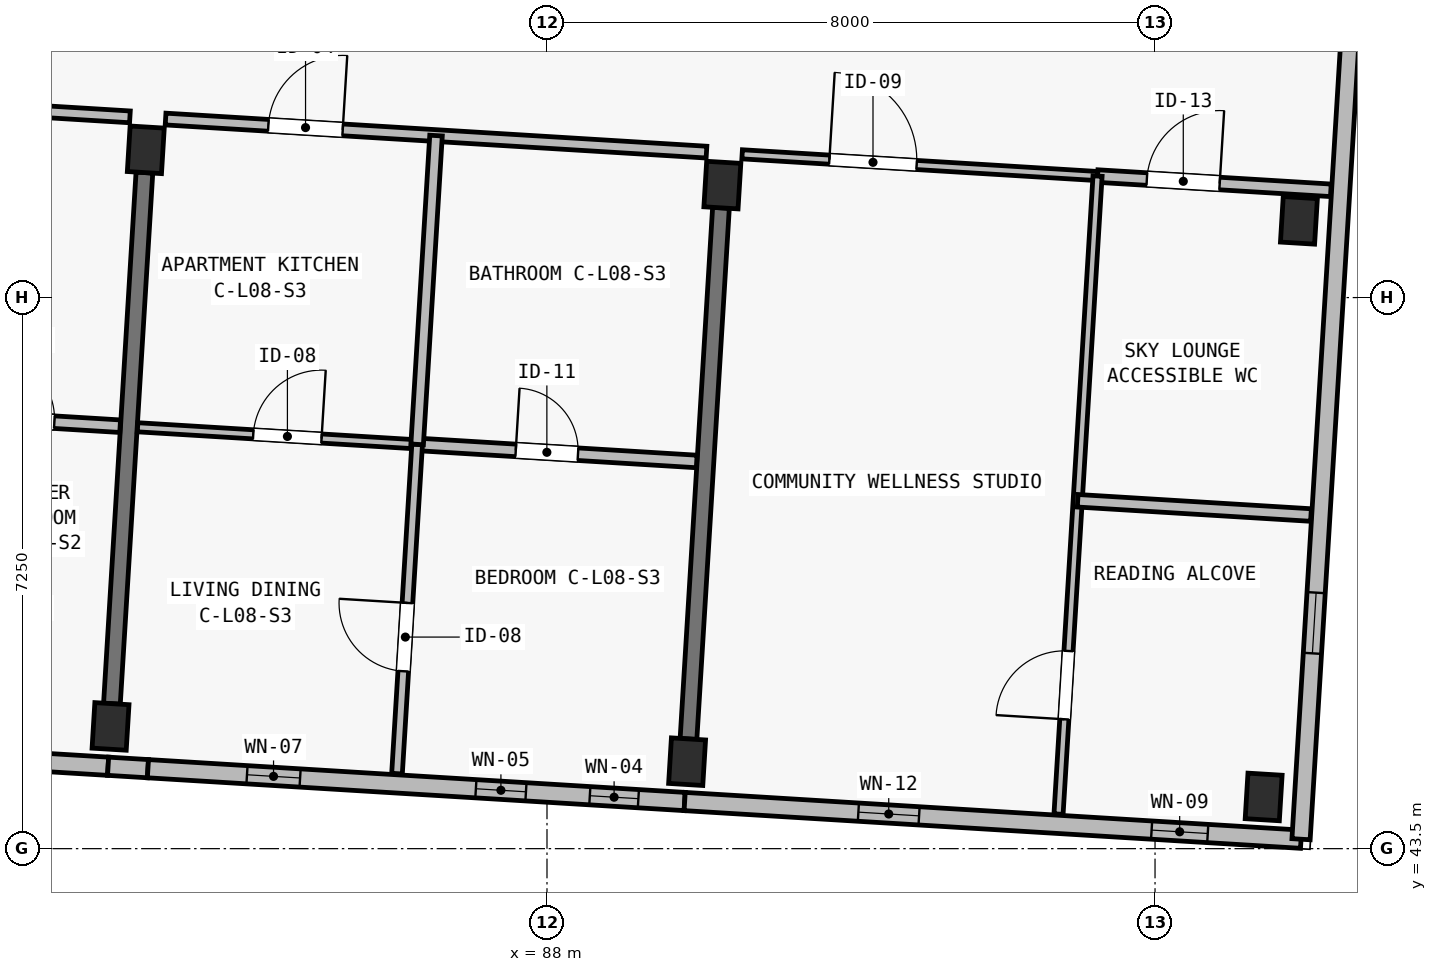
"""IFC4 building model, lengths in metres.
Left out: names, types, materials, properties, quantities, classifications, styles, units other than length and angle.
Written with IfcOpenShell. Run it as: python <this file> out.ifc"""

import sys

from ifc_helpers import new_model, si_unit, direction, frame, frame_2d, origin, origin_2d, place, context, subcontext, project, spatial, polyline, rectangle, outline, extrude, element, fill, save


model = new_model("IFC4")
c1 = context("Model", 3, precision=1e-05, world=origin(), true_north=direction((0.0, 1.0)))
c2 = subcontext(c1, "Body", "Model", "MODEL_VIEW")
j1 = project(units=[si_unit("LENGTHUNIT", "METRE"), si_unit("PLANEANGLEUNIT", "RADIAN")], contexts=[c1])
p1 = place(None, origin())
s1 = spatial("IfcSite", under=j1, at=p1, CompositionType="ELEMENT")
p2 = place(p1, origin())
s2 = spatial("IfcBuilding", under=s1, at=p2, CompositionType="ELEMENT")
p3 = place(p2, frame((0.0, 0.0, 27.9)))
s3 = spatial("IfcBuildingStorey", under=s2, at=p3, CompositionType="ELEMENT", Elevation=27.9)
for number, where, z_axis, x_axis in (
    (1, (82.258, 45.108, 0.0), (0.0, 0.0, 1.0), (0.998, -0.061, 0.0)),
    (2, (82.721, 52.694, 0.0), (0.0, 0.0, 1.0), (0.998, -0.061, 0.0)),
    (3, (89.843, 44.644, 0.0), (0.0, 0.0, 1.0), (0.998, -0.061, 0.0)),
    (4, (90.307, 52.23, 0.0), (0.0, 0.0, 1.0), (0.998, -0.061, 0.0)),
    (5, (97.429, 44.18, 0.0), (0.0, 0.0, 1.0), (0.998, -0.061, 0.0)),
    (6, (97.893, 51.766, 0.0), (0.0, 0.0, 1.0), (0.998, -0.061, 0.0)),
):
    element("IfcColumn", number, at=place(p3, frame(where, z_axis=z_axis, x_axis=x_axis)), inside=s3, PredefinedType="COLUMN", context=c2, shape_type="SweptSolid", body=[
        extrude(rectangle(XDim=0.45, YDim=0.6, at=origin_2d()), origin(), (0.0, 0.0, 1.0), 3.25),
    ])
for number, where, z_axis, x_axis in (
    (7, (82.276, 45.407, 0.0), (0.0, 0.0, 1.0), (0.061, 0.998, 0.0)),
    (8, (89.862, 44.944, 0.0), (0.0, 0.0, 1.0), (0.061, 0.998, 0.0)),
):
    element("IfcWall", number, at=place(p3, frame(where, z_axis=z_axis, x_axis=x_axis)), inside=s3, PredefinedType="SHEAR", context=c2, shape_type="SweptSolid", body=[
        extrude(rectangle(XDim=7.0, YDim=0.22, at=frame_2d((3.5, 0.0))), origin(), (0.0, 0.0, 1.0), 2.5),
    ])
p4 = place(p3, frame((82.225, 44.584, 0.0), z_axis=(0.0, 0.0, 1.0), x_axis=(-0.998133591969, 0.061068261669, 0.0)))
e9 = element("IfcWall", 9, at=p4, inside=s3, PredefinedType="SOLIDWALL", context=c2, shape_type="SweptSolid", body=[
    extrude(rectangle(XDim=7.6, YDim=0.24, at=frame_2d((3.8, 0.0))), origin(), (0.0, 0.0, 1.0), 3.0),
])
p5 = place(p4, frame((5.019, 0.0, 0.0)))
e10 = element("IfcOpeningElement", 10, at=p5, cuts=e9, PredefinedType="OPENING", context=c2, shape_type="SweptSolid", body=[
    extrude(rectangle(XDim=1.8, YDim=2.12, at=frame_2d((0.9, 1.06))), frame((0.0, 0.135, 0.0), z_axis=(0.0, -1.0, 0.0), x_axis=(1.0, 0.0, 0.0)), (0.0, 0.0, 1.0), 0.27),
])
p6 = place(p4, frame((0.93, 0.0, 0.46)))
e11 = element("IfcOpeningElement", 11, at=p6, cuts=e9, PredefinedType="OPENING", context=c2, shape_type="SweptSolid", body=[
    extrude(rectangle(XDim=0.74, YDim=2.26, at=frame_2d((0.37, 1.13))), frame((0.0, 0.135, 0.0), z_axis=(0.0, -1.0, 0.0), x_axis=(1.0, 0.0, 0.0)), (0.0, 0.0, 1.0), 0.27),
])
p7 = place(p3, frame((82.75, 44.552, 0.0), z_axis=(0.0, 0.0, 1.0), x_axis=(-0.998143743648, 0.060902110115, 0.0)))
e12 = element("IfcWall", 12, at=p7, inside=s3, PredefinedType="SOLIDWALL", context=c2, shape_type="SweptSolid", body=[
    extrude(rectangle(XDim=0.525, YDim=0.24, at=frame_2d((0.263, 0.0))), origin(), (0.0, 0.0, 1.0), 3.0),
])
p8 = place(p3, frame((89.811, 44.12, 0.0), z_axis=(0.0, 0.0, 1.0), x_axis=(-0.998135069216, 0.061044111925, 0.0)))
e13 = element("IfcWall", 13, at=p8, inside=s3, PredefinedType="SOLIDWALL", context=c2, shape_type="SweptSolid", body=[
    extrude(outline(polyline([(0.0, 0.0), (7.075, 0.0), (7.075, 6.222), (0.0, 4.861), (0.0, 0.0)])), frame((0.0, 0.12, 0.0), z_axis=(0.0, -1.0, 0.0), x_axis=(1.0, 0.0, 0.0)), (0.0, 0.0, 1.0), 0.24),
])
p9 = place(p8, frame((0.61, 0.0, 0.52)))
e14 = element("IfcOpeningElement", 14, at=p9, cuts=e13, PredefinedType="OPENING", context=c2, shape_type="SweptSolid", body=[
    extrude(rectangle(XDim=0.64, YDim=2.18, at=frame_2d((0.32, 1.09))), frame((0.0, 0.135, 0.0), z_axis=(0.0, -1.0, 0.0), x_axis=(1.0, 0.0, 0.0)), (0.0, 0.0, 1.0), 0.27),
])
p10 = place(p8, frame((2.092, 0.0, 0.42)))
e15 = element("IfcOpeningElement", 15, at=p10, cuts=e13, PredefinedType="OPENING", context=c2, shape_type="SweptSolid", body=[
    extrude(rectangle(XDim=0.66, YDim=2.32, at=frame_2d((0.33, 1.16))), frame((0.0, 0.135, 0.0), z_axis=(0.0, -1.0, 0.0), x_axis=(1.0, 0.0, 0.0)), (0.0, 0.0, 1.0), 0.27),
])
p11 = place(p8, frame((5.069, 0.0, 0.52)))
e16 = element("IfcOpeningElement", 16, at=p11, cuts=e13, PredefinedType="OPENING", context=c2, shape_type="SweptSolid", body=[
    extrude(rectangle(XDim=0.7, YDim=2.36, at=frame_2d((0.35, 1.18))), frame((0.0, 0.135, 0.0), z_axis=(0.0, -1.0, 0.0), x_axis=(1.0, 0.0, 0.0)), (0.0, 0.0, 1.0), 0.27),
])
p12 = place(p3, frame((97.921, 43.624, 0.0), z_axis=(0.0, 0.0, 1.0), x_axis=(-0.998134248939, 0.061057522844, 0.0)))
e17 = element("IfcWall", 17, at=p12, inside=s3, PredefinedType="SOLIDWALL", context=c2, shape_type="SweptSolid", body=[
    extrude(outline(polyline([(0.0, 0.0), (8.125, 0.0), (8.125, 4.861), (0.0, 3.298), (0.0, 0.0)])), frame((0.0, 0.12, 0.0), z_axis=(0.0, -1.0, 0.0), x_axis=(1.0, 0.0, 0.0)), (0.0, 0.0, 1.0), 0.24),
])
p13 = place(p12, frame((1.23, 0.0, 0.42)))
e18 = element("IfcOpeningElement", 18, at=p13, cuts=e17, PredefinedType="OPENING", context=c2, shape_type="SweptSolid", body=[
    extrude(rectangle(XDim=0.74, YDim=2.26, at=frame_2d((0.37, 1.13))), frame((0.0, 0.135, 0.0), z_axis=(0.0, -1.0, 0.0), x_axis=(1.0, 0.0, 0.0)), (0.0, 0.0, 1.0), 0.27),
])
p14 = place(p12, frame((5.035, 0.0, 0.42)))
e19 = element("IfcOpeningElement", 19, at=p14, cuts=e17, PredefinedType="OPENING", context=c2, shape_type="SweptSolid", body=[
    extrude(rectangle(XDim=0.8, YDim=2.3, at=frame_2d((0.4, 1.15))), frame((0.0, 0.135, 0.0), z_axis=(0.0, -1.0, 0.0), x_axis=(1.0, 0.0, 0.0)), (0.0, 0.0, 1.0), 0.27),
])
p15 = place(p3, frame((99.182, 64.236, 0.0), z_axis=(0.0, 0.0, 1.0), x_axis=(-0.061040833846, -0.998135269692, 0.0)))
e20 = element("IfcWall", 20, at=p15, inside=s3, PredefinedType="SOLIDWALL", context=c2, shape_type="SweptSolid", body=[
    extrude(rectangle(XDim=20.65, YDim=0.24, at=frame_2d((10.325, 0.0))), origin(), (0.0, 0.0, 1.0), 3.298),
])
p16 = place(p15, frame((2.45, 0.0, 0.45)))
e21 = element("IfcOpeningElement", 21, at=p16, cuts=e20, PredefinedType="OPENING", context=c2, shape_type="SweptSolid", body=[
    extrude(rectangle(XDim=0.66, YDim=2.32, at=frame_2d((0.33, 1.16))), frame((0.0, 0.135, 0.0), z_axis=(0.0, -1.0, 0.0), x_axis=(1.0, 0.0, 0.0)), (0.0, 0.0, 1.0), 0.27),
])
p17 = place(p15, frame((17.4, 0.0, 0.52)))
e22 = element("IfcOpeningElement", 22, at=p17, cuts=e20, PredefinedType="OPENING", context=c2, shape_type="SweptSolid", body=[
    extrude(rectangle(XDim=0.8, YDim=2.3, at=frame_2d((0.4, 1.15))), frame((0.0, 0.135, 0.0), z_axis=(0.0, -1.0, 0.0), x_axis=(1.0, 0.0, 0.0)), (0.0, 0.0, 1.0), 0.27),
])
p18 = place(p3, frame((78.415, 53.378, 0.0), z_axis=(0.0, 0.0, 1.0), x_axis=(0.998132736029, -0.061082250024, 0.0)))
e23 = element("IfcWall", 23, at=p18, inside=s3, PredefinedType="PARTITIONING", context=c2, shape_type="SweptSolid", body=[
    extrude(rectangle(XDim=4.105, YDim=0.155, at=frame_2d((2.052, 0.0))), origin(), (0.0, 0.0, 1.0), 2.97),
])
p19 = place(p18, frame((0.457, 0.0, 0.0)))
e24 = element("IfcOpeningElement", 24, at=p19, cuts=e23, PredefinedType="OPENING", context=c2, shape_type="SweptSolid", body=[
    extrude(rectangle(XDim=1.02, YDim=2.2, at=frame_2d((0.51, 1.1))), frame((0.0, 0.093, 0.0), z_axis=(0.0, -1.0, 0.0), x_axis=(1.0, 0.0, 0.0)), (0.0, 0.0, 1.0), 0.185),
])
p20 = place(p3, frame((80.098, 49.198, 0.0), z_axis=(0.0, 0.0, 1.0), x_axis=(0.998138723231, -0.060984335579, 0.0)))
e25 = element("IfcWall", 25, at=p20, inside=s3, PredefinedType="PLUMBINGWALL", context=c2, shape_type="SweptSolid", body=[
    extrude(rectangle(XDim=2.29, YDim=0.165, at=frame_2d((1.145, 0.0))), origin(), (0.0, 0.0, 1.0), 2.97),
])
p21 = place(p20, frame((0.603, 0.0, 0.0)))
e26 = element("IfcOpeningElement", 26, at=p21, cuts=e25, PredefinedType="OPENING", context=c2, shape_type="SweptSolid", body=[
    extrude(rectangle(XDim=0.82, YDim=2.08, at=frame_2d((0.41, 1.04))), frame((0.0, 0.097, 0.0), z_axis=(0.0, -1.0, 0.0), x_axis=(1.0, 0.0, 0.0)), (0.0, 0.0, 1.0), 0.195),
])
p22 = place(p3, frame((82.982, 53.099, 0.0), z_axis=(0.0, 0.0, 1.0), x_axis=(0.998134569689, -0.061052279168, 0.0)))
e27 = element("IfcWall", 27, at=p22, inside=s3, PredefinedType="PARTITIONING", context=c2, shape_type="SweptSolid", body=[
    extrude(rectangle(XDim=7.13, YDim=0.155, at=frame_2d((3.565, 0.0))), origin(), (0.0, 0.0, 1.0), 2.97),
])
p23 = place(p22, frame((1.355, 0.0, 0.0)))
e28 = element("IfcOpeningElement", 28, at=p23, cuts=e27, PredefinedType="OPENING", context=c2, shape_type="SweptSolid", body=[
    extrude(rectangle(XDim=0.98, YDim=2.15, at=frame_2d((0.49, 1.075))), frame((0.0, 0.093, 0.0), z_axis=(0.0, -1.0, 0.0), x_axis=(1.0, 0.0, 0.0)), (0.0, 0.0, 1.0), 0.185),
])
p24 = place(p3, frame((82.613, 49.044, 0.0), z_axis=(0.0, 0.0, 1.0), x_axis=(0.998136719672, -0.061017119263, 0.0)))
e29 = element("IfcWall", 29, at=p24, inside=s3, PredefinedType="PARTITIONING", context=c2, shape_type="SweptSolid", body=[
    extrude(rectangle(XDim=3.685, YDim=0.12, at=frame_2d((1.843, 0.0))), origin(), (0.0, 0.0, 1.0), 2.97),
])
p25 = place(p24, frame((1.525, 0.0, 0.0)))
e30 = element("IfcOpeningElement", 30, at=p25, cuts=e29, PredefinedType="OPENING", context=c2, shape_type="SweptSolid", body=[
    extrude(rectangle(XDim=0.9, YDim=2.1, at=frame_2d((0.45, 1.05))), frame((0.0, 0.075, 0.0), z_axis=(0.0, -1.0, 0.0), x_axis=(1.0, 0.0, 0.0)), (0.0, 0.0, 1.0), 0.15),
])
p26 = place(p3, frame((86.292, 48.819, 0.0), z_axis=(0.0, 0.0, 1.0), x_axis=(0.998132682596, -0.061083123148, 0.0)))
e31 = element("IfcWall", 31, at=p26, inside=s3, PredefinedType="PLUMBINGWALL", context=c2, shape_type="SweptSolid", body=[
    extrude(rectangle(XDim=3.685, YDim=0.165, at=frame_2d((1.843, 0.0))), origin(), (0.0, 0.0, 1.0), 2.97),
])
p27 = place(p26, frame((1.3, 0.0, 0.0)))
e32 = element("IfcOpeningElement", 32, at=p27, cuts=e31, PredefinedType="OPENING", context=c2, shape_type="SweptSolid", body=[
    extrude(rectangle(XDim=0.82, YDim=2.08, at=frame_2d((0.41, 1.04))), frame((0.0, 0.097, 0.0), z_axis=(0.0, -1.0, 0.0), x_axis=(1.0, 0.0, 0.0)), (0.0, 0.0, 1.0), 0.195),
])
p28 = place(p3, frame((86.027, 44.487, 0.0), z_axis=(0.0, 0.0, 1.0), x_axis=(0.06103343432, 0.998135722182, 0.0)))
e33 = element("IfcWall", 33, at=p28, inside=s3, PredefinedType="PARTITIONING", context=c2, shape_type="SweptSolid", body=[
    extrude(rectangle(XDim=4.34, YDim=0.14, at=frame_2d((2.17, 0.0))), origin(), (0.0, 0.0, 1.0), 2.97),
])
p29 = place(p28, frame((1.35, 0.0, 0.0)))
e34 = element("IfcOpeningElement", 34, at=p29, cuts=e33, PredefinedType="OPENING", context=c2, shape_type="SweptSolid", body=[
    extrude(rectangle(XDim=0.9, YDim=2.1, at=frame_2d((0.45, 1.05))), frame((0.0, 0.085, 0.0), z_axis=(0.0, -1.0, 0.0), x_axis=(1.0, 0.0, 0.0)), (0.0, 0.0, 1.0), 0.17),
])
p30 = place(p3, frame((86.292, 48.819, 0.0), z_axis=(0.0, 0.0, 1.0), x_axis=(0.061067374954, 0.99813364622, 0.0)))
e35 = element("IfcWall", 35, at=p30, inside=s3, PredefinedType="PLUMBINGWALL", context=c2, shape_type="SweptSolid", body=[
    extrude(rectangle(XDim=4.07, YDim=0.165, at=frame_2d((2.035, 0.0))), origin(), (0.0, 0.0, 1.0), 2.97),
])
p31 = place(p3, frame((90.567, 52.635, 0.0), z_axis=(0.0, 0.0, 1.0), x_axis=(0.998136413786, -0.061022122823, 0.0)))
e36 = element("IfcWall", 36, at=p31, inside=s3, PredefinedType="PARTITIONING", context=c2, shape_type="SweptSolid", body=[
    extrude(rectangle(XDim=4.685, YDim=0.12, at=frame_2d((2.343, 0.0))), origin(), (0.0, 0.0, 1.0), 3.15),
])
p32 = place(p31, frame((1.15, 0.0, 0.0)))
e37 = element("IfcOpeningElement", 37, at=p32, cuts=e36, PredefinedType="OPENING", context=c2, shape_type="SweptSolid", body=[
    extrude(rectangle(XDim=1.15, YDim=2.15, at=frame_2d((0.575, 1.075))), frame((0.0, 0.075, 0.0), z_axis=(0.0, -1.0, 0.0), x_axis=(1.0, 0.0, 0.0)), (0.0, 0.0, 1.0), 0.15),
])
p33 = place(p3, frame((95.244, 52.349, 0.0), z_axis=(0.0, 0.0, 1.0), x_axis=(0.998134491017, -0.061053565351, 0.0)))
e38 = element("IfcWall", 38, at=p33, inside=s3, PredefinedType="PLUMBINGWALL", context=c2, shape_type="SweptSolid", body=[
    extrude(rectangle(XDim=3.075, YDim=0.165, at=frame_2d((1.538, 0.0))), origin(), (0.0, 0.0, 1.0), 3.15),
])
p34 = place(p33, frame((0.65, 0.0, 0.0)))
e39 = element("IfcOpeningElement", 39, at=p34, cuts=e38, PredefinedType="OPENING", context=c2, shape_type="SweptSolid", body=[
    extrude(rectangle(XDim=0.96, YDim=2.12, at=frame_2d((0.48, 1.06))), frame((0.0, 0.097, 0.0), z_axis=(0.0, -1.0, 0.0), x_axis=(1.0, 0.0, 0.0)), (0.0, 0.0, 1.0), 0.195),
])
p35 = place(p3, frame((94.73, 43.955, 0.0), z_axis=(0.0, 0.0, 1.0), x_axis=(0.061049859271, 0.998134717702, 0.0)))
e40 = element("IfcWall", 40, at=p35, inside=s3, PredefinedType="PARTITIONING", context=c2, shape_type="SweptSolid", body=[
    extrude(rectangle(XDim=8.41, YDim=0.12, at=frame_2d((4.205, 0.0))), origin(), (0.0, 0.0, 1.0), 3.15),
])
p36 = place(p35, frame((1.25, 0.0, 0.0)))
e41 = element("IfcOpeningElement", 41, at=p36, cuts=e40, PredefinedType="OPENING", context=c2, shape_type="SweptSolid", body=[
    extrude(rectangle(XDim=0.9, YDim=2.1, at=frame_2d((0.45, 1.05))), frame((0.0, 0.075, 0.0), z_axis=(0.0, -1.0, 0.0), x_axis=(1.0, 0.0, 0.0)), (0.0, 0.0, 1.0), 0.15),
])
p37 = place(p3, frame((94.982, 48.077, 0.0), z_axis=(0.0, 0.0, 1.0), x_axis=(0.998134491017, -0.061053565351, 0.0)))
e42 = element("IfcWall", 42, at=p37, inside=s3, PredefinedType="PLUMBINGWALL", context=c2, shape_type="SweptSolid", body=[
    extrude(rectangle(XDim=3.075, YDim=0.165, at=frame_2d((1.538, 0.0))), origin(), (0.0, 0.0, 1.0), 3.15),
])
p38 = place(p9, origin())
e43 = element("IfcWindow", 43, at=p38, inside=s3, PartitioningType="SINGLE_PANEL", PredefinedType="WINDOW", context=c2, shape_type="SweptSolid", body=[
    extrude(rectangle(XDim=0.64, YDim=2.18, at=frame_2d((0.32, 1.09))), frame((0.0, 0.03, 0.0), z_axis=(0.0, -1.0, 0.0), x_axis=(1.0, 0.0, 0.0)), (0.0, 0.0, 1.0), 0.06),
])
fill(e14, e43)
p39 = place(p10, origin())
e44 = element("IfcWindow", 44, at=p39, inside=s3, PartitioningType="SINGLE_PANEL", PredefinedType="WINDOW", context=c2, shape_type="SweptSolid", body=[
    extrude(rectangle(XDim=0.66, YDim=2.32, at=frame_2d((0.33, 1.16))), frame((0.0, 0.03, 0.0), z_axis=(0.0, -1.0, 0.0), x_axis=(1.0, 0.0, 0.0)), (0.0, 0.0, 1.0), 0.06),
])
fill(e15, e44)
p40 = place(p11, origin())
e45 = element("IfcWindow", 45, at=p40, inside=s3, PartitioningType="SINGLE_PANEL", PredefinedType="WINDOW", context=c2, shape_type="SweptSolid", body=[
    extrude(rectangle(XDim=0.7, YDim=2.36, at=frame_2d((0.35, 1.18))), frame((0.0, 0.03, 0.0), z_axis=(0.0, -1.0, 0.0), x_axis=(1.0, 0.0, 0.0)), (0.0, 0.0, 1.0), 0.06),
])
fill(e16, e45)
p41 = place(p13, origin())
e46 = element("IfcWindow", 46, at=p41, inside=s3, PartitioningType="SINGLE_PANEL", PredefinedType="WINDOW", context=c2, shape_type="SweptSolid", body=[
    extrude(rectangle(XDim=0.74, YDim=2.26, at=frame_2d((0.37, 1.13))), frame((0.0, 0.03, 0.0), z_axis=(0.0, -1.0, 0.0), x_axis=(1.0, 0.0, 0.0)), (0.0, 0.0, 1.0), 0.06),
])
fill(e18, e46)
p42 = place(p14, origin())
e47 = element("IfcWindow", 47, at=p42, inside=s3, PartitioningType="SINGLE_PANEL", PredefinedType="WINDOW", context=c2, shape_type="SweptSolid", body=[
    extrude(rectangle(XDim=0.8, YDim=2.3, at=frame_2d((0.4, 1.15))), frame((0.0, 0.03, 0.0), z_axis=(0.0, -1.0, 0.0), x_axis=(1.0, 0.0, 0.0)), (0.0, 0.0, 1.0), 0.06),
])
fill(e19, e47)
p43 = place(p17, origin())
e48 = element("IfcWindow", 48, at=p43, inside=s3, PartitioningType="SINGLE_PANEL", PredefinedType="WINDOW", context=c2, shape_type="SweptSolid", body=[
    extrude(rectangle(XDim=0.8, YDim=2.3, at=frame_2d((0.4, 1.15))), frame((0.0, 0.03, 0.0), z_axis=(0.0, -1.0, 0.0), x_axis=(1.0, 0.0, 0.0)), (0.0, 0.0, 1.0), 0.06),
])
fill(e22, e48)
p44 = place(p21, origin())
e49 = element("IfcDoor", 49, at=p44, inside=s3, OperationType="SINGLE_SWING_LEFT", PredefinedType="DOOR", context=c2, shape_type="SweptSolid", body=[
    extrude(rectangle(XDim=0.82, YDim=2.08, at=frame_2d((0.41, 1.04))), frame((0.0, 0.025, 0.0), z_axis=(0.0, -1.0, 0.0), x_axis=(1.0, 0.0, 0.0)), (0.0, 0.0, 1.0), 0.05),
])
fill(e26, e49)
p45 = place(p23, origin())
e50 = element("IfcDoor", 50, at=p45, inside=s3, OperationType="SINGLE_SWING_RIGHT", PredefinedType="DOOR", context=c2, shape_type="SweptSolid", body=[
    extrude(rectangle(XDim=0.98, YDim=2.15, at=frame_2d((0.49, 1.075))), frame((0.0, 0.025, 0.0), z_axis=(0.0, -1.0, 0.0), x_axis=(1.0, 0.0, 0.0)), (0.0, 0.0, 1.0), 0.05),
])
fill(e28, e50)
p46 = place(p25, origin())
e51 = element("IfcDoor", 51, at=p46, inside=s3, OperationType="SINGLE_SWING_RIGHT", PredefinedType="DOOR", context=c2, shape_type="SweptSolid", body=[
    extrude(rectangle(XDim=0.9, YDim=2.1, at=frame_2d((0.45, 1.05))), frame((0.0, 0.025, 0.0), z_axis=(0.0, -1.0, 0.0), x_axis=(1.0, 0.0, 0.0)), (0.0, 0.0, 1.0), 0.05),
])
fill(e30, e51)
p47 = place(p27, origin())
e52 = element("IfcDoor", 52, at=p47, inside=s3, OperationType="SINGLE_SWING_LEFT", PredefinedType="DOOR", context=c2, shape_type="SweptSolid", body=[
    extrude(rectangle(XDim=0.82, YDim=2.08, at=frame_2d((0.41, 1.04))), frame((0.0, 0.025, 0.0), z_axis=(0.0, -1.0, 0.0), x_axis=(1.0, 0.0, 0.0)), (0.0, 0.0, 1.0), 0.05),
])
fill(e32, e52)
p48 = place(p29, origin())
e53 = element("IfcDoor", 53, at=p48, inside=s3, OperationType="SINGLE_SWING_RIGHT", PredefinedType="DOOR", context=c2, shape_type="SweptSolid", body=[
    extrude(rectangle(XDim=0.9, YDim=2.1, at=frame_2d((0.45, 1.05))), frame((0.0, 0.025, 0.0), z_axis=(0.0, -1.0, 0.0), x_axis=(1.0, 0.0, 0.0)), (0.0, 0.0, 1.0), 0.05),
])
fill(e34, e53)
p49 = place(p32, origin())
e54 = element("IfcDoor", 54, at=p49, inside=s3, OperationType="SINGLE_SWING_LEFT", PredefinedType="DOOR", context=c2, shape_type="SweptSolid", body=[
    extrude(rectangle(XDim=1.15, YDim=2.15, at=frame_2d((0.575, 1.075))), frame((0.0, 0.025, 0.0), z_axis=(0.0, -1.0, 0.0), x_axis=(1.0, 0.0, 0.0)), (0.0, 0.0, 1.0), 0.05),
])
fill(e37, e54)
p50 = place(p34, origin())
e55 = element("IfcDoor", 55, at=p50, inside=s3, OperationType="SINGLE_SWING_RIGHT", PredefinedType="DOOR", context=c2, shape_type="SweptSolid", body=[
    extrude(rectangle(XDim=0.96, YDim=2.12, at=frame_2d((0.48, 1.06))), frame((0.0, 0.025, 0.0), z_axis=(0.0, -1.0, 0.0), x_axis=(1.0, 0.0, 0.0)), (0.0, 0.0, 1.0), 0.05),
])
fill(e39, e55)
p51 = place(p36, origin())
e56 = element("IfcDoor", 56, at=p51, inside=s3, OperationType="SINGLE_SWING_LEFT", PredefinedType="DOOR", context=c2, shape_type="SweptSolid", body=[
    extrude(rectangle(XDim=0.9, YDim=2.1, at=frame_2d((0.45, 1.05))), frame((0.0, 0.025, 0.0), z_axis=(0.0, -1.0, 0.0), x_axis=(1.0, 0.0, 0.0)), (0.0, 0.0, 1.0), 0.05),
])
fill(e41, e56)
save(model, sys.argv[1])
